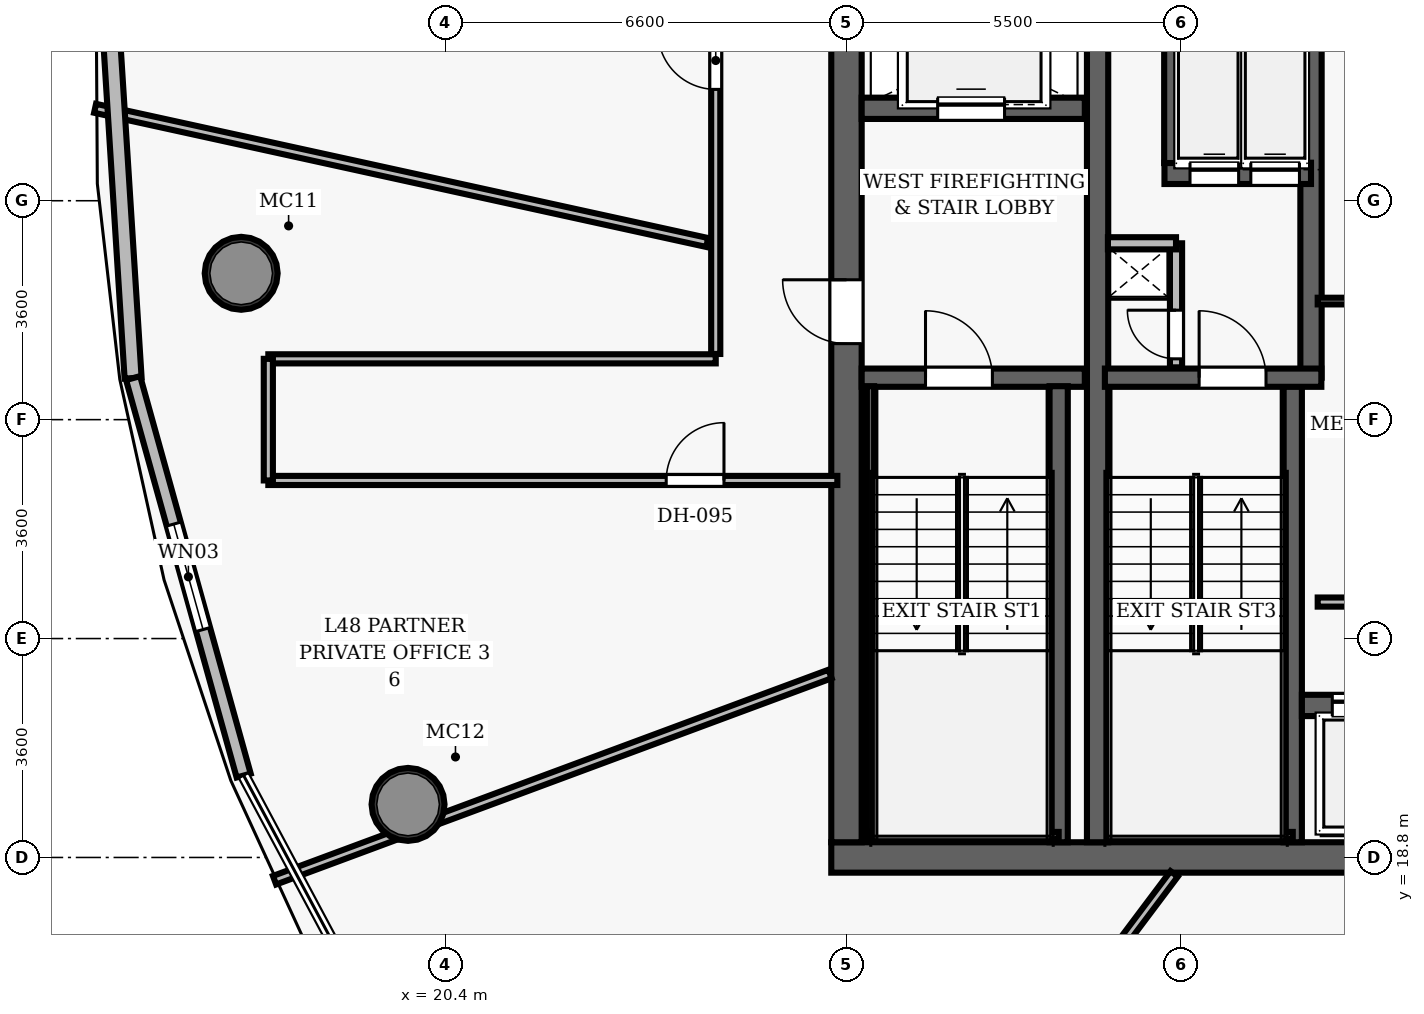
"""IFC4 building model, lengths in metres.
Left out: names, types, materials, properties, quantities, classifications, styles, units other than length and angle.
Written with IfcOpenShell. Run it as: python <this file> out.ifc"""

import sys

from ifc_helpers import new_model, si_unit, direction, frame, frame_2d, origin, origin_2d, place, context, subcontext, project, spatial, rectangle, hollow_circle, extrude, element, fill, save


model = new_model("IFC4")
c1 = context("Model", 3, precision=1e-05, world=origin(), true_north=direction((0.0, 1.0)))
c2 = subcontext(c1, "Body", "Model", "MODEL_VIEW")
j1 = project(units=[si_unit("LENGTHUNIT", "METRE"), si_unit("PLANEANGLEUNIT", "RADIAN")], contexts=[c1])
p1 = place(None, origin())
s1 = spatial("IfcSite", under=j1, at=p1, CompositionType="ELEMENT")
p2 = place(p1, origin())
s2 = spatial("IfcBuilding", under=s1, at=p2, CompositionType="ELEMENT")
p3 = place(p2, frame((0.0, 0.0, 190.45)))
s3 = spatial("IfcBuildingStorey", under=s2, at=p3, CompositionType="ELEMENT", Elevation=190.45)
p4 = place(p3, frame((26.75, 18.8, 0.0), z_axis=(0.0, 0.0, 1.0), x_axis=(1.0, 0.0, 0.0)))
e1 = element("IfcWall", 1, at=p4, inside=s3, PredefinedType="SHEAR", context=c2, shape_type="SweptSolid", body=[
    extrude(rectangle(XDim=22.5, YDim=0.5, at=frame_2d((11.25, 0.0))), origin(), (0.0, 0.0, 1.0), 3.85),
])
p5 = place(p4, frame((14.47, 0.0, 0.0)))
e2 = element("IfcOpeningElement", 2, at=p5, cuts=e1, PredefinedType="OPENING", context=c2, shape_type="SweptSolid", body=[
    extrude(rectangle(XDim=1.05, YDim=2.15, at=frame_2d((0.525, 1.075))), frame((0.0, 0.26, 0.0), z_axis=(0.0, -1.0, 0.0), x_axis=(1.0, 0.0, 0.0)), (0.0, 0.0, 1.0), 0.52),
])
p6 = place(p3, frame((27.0, 19.05, 0.0), z_axis=(0.0, 0.0, 1.0), x_axis=(0.0, 1.0, 0.0)))
e3 = element("IfcWall", 3, at=p6, inside=s3, PredefinedType="SHEAR", context=c2, shape_type="SweptSolid", body=[
    extrude(rectangle(XDim=13.9, YDim=0.5, at=frame_2d((6.95, 0.0))), origin(), (0.0, 0.0, 1.0), 3.85),
])
p7 = place(p6, frame((8.2, 0.0, 0.0)))
e4 = element("IfcOpeningElement", 4, at=p7, cuts=e3, PredefinedType="OPENING", context=c2, shape_type="SweptSolid", body=[
    extrude(rectangle(XDim=1.05, YDim=2.15, at=frame_2d((0.525, 1.075))), frame((0.0, 0.26, 0.0), z_axis=(0.0, -1.0, 0.0), x_axis=(1.0, 0.0, 0.0)), (0.0, 0.0, 1.0), 0.52),
])
p8 = place(p3, frame((31.13, 19.05, 0.0), z_axis=(0.0, 0.0, 1.0), x_axis=(0.0, 1.0, 0.0)))
e5 = element("IfcWall", 5, at=p8, inside=s3, PredefinedType="SHEAR", context=c2, shape_type="SweptSolid", body=[
    extrude(rectangle(XDim=13.9, YDim=0.35, at=frame_2d((6.95, 0.0))), origin(), (0.0, 0.0, 1.0), 3.85),
])
for number, where, z_axis, x_axis in (
    (6, (17.045, 28.406, 0.0), (0.0, 0.0, 1.0), (1.0, 0.0, 0.0)),
    (7, (19.79, 19.673, 0.0), (0.0, 0.0, 1.0), (1.0, 0.0, 0.0)),
):
    element("IfcColumn", number, at=place(p3, frame(where, z_axis=z_axis, x_axis=x_axis)), inside=s3, PredefinedType="COLUMN", context=c2, shape_type="SweptSolid", body=[
        extrude(hollow_circle(Radius=0.6, WallThickness=0.05, at=origin_2d()), origin(), (0.0, 0.0, 1.0), 3.85),
    ])
p9 = place(p3, frame((27.25, 26.69, 0.0), z_axis=(0.0, 0.0, 1.0), x_axis=(1.0, 0.0, 0.0)))
e8 = element("IfcWall", 8, at=p9, inside=s3, PredefinedType="SHEAR", context=c2, shape_type="SweptSolid", body=[
    extrude(rectangle(XDim=3.67, YDim=0.3, at=frame_2d((1.835, 0.0))), origin(), (0.0, 0.0, 1.0), 3.85),
])
p10 = place(p9, frame((1.05, 0.0, 0.0)))
e9 = element("IfcOpeningElement", 9, at=p10, cuts=e8, PredefinedType="OPENING", context=c2, shape_type="SweptSolid", body=[
    extrude(rectangle(XDim=1.1, YDim=2.15, at=frame_2d((0.55, 1.075))), frame((0.0, 0.16, 0.0), z_axis=(0.0, -1.0, 0.0), x_axis=(1.0, 0.0, 0.0)), (0.0, 0.0, 1.0), 0.32),
])
p11 = place(p3, frame((30.49, 19.05, 0.0), z_axis=(0.0, 0.0, 1.0), x_axis=(0.0, 1.0, 0.0)))
e10 = element("IfcWall", 10, at=p11, inside=s3, PredefinedType="SHEAR", context=c2, shape_type="SweptSolid", body=[
    extrude(rectangle(XDim=7.5, YDim=0.3, at=frame_2d((3.75, 0.0))), origin(), (0.0, 0.0, 1.0), 3.85),
])
p12 = place(p3, frame((27.395, 19.1, 0.0), z_axis=(0.0, 0.0, 1.0), x_axis=(0.0, 1.0, 0.0)))
e11 = element("IfcWall", 11, at=p12, inside=s3, PredefinedType="SHEAR", context=c2, shape_type="SweptSolid", body=[
    extrude(rectangle(XDim=7.45, YDim=0.12, at=frame_2d((3.725, 0.0))), origin(), (0.0, 0.0, 1.0), 3.85),
])
p13 = place(p3, frame((27.395, 19.16, 0.0), z_axis=(0.0, 0.0, 1.0), x_axis=(1.0, 0.0, 0.0)))
e12 = element("IfcWall", 12, at=p13, inside=s3, PredefinedType="SHEAR", context=c2, shape_type="SweptSolid", body=[
    extrude(rectangle(XDim=3.095, YDim=0.12, at=frame_2d((1.547, 0.0))), origin(), (0.0, 0.0, 1.0), 3.85),
])
p14 = place(p3, frame((27.25, 31.12, 0.0), z_axis=(0.0, 0.0, 1.0), x_axis=(1.0, 0.0, 0.0)))
e13 = element("IfcWall", 13, at=p14, inside=s3, PredefinedType="SHEAR", context=c2, shape_type="SweptSolid", body=[
    extrude(rectangle(XDim=3.67, YDim=0.35, at=frame_2d((1.835, 0.0))), origin(), (0.0, 0.0, 1.0), 3.035),
])
p15 = place(p14, frame((1.25, 0.0, 0.0)))
e14 = element("IfcOpeningElement", 14, at=p15, cuts=e13, PredefinedType="OPENING", context=c2, shape_type="SweptSolid", body=[
    extrude(rectangle(XDim=1.1, YDim=2.15, at=frame_2d((0.55, 1.075))), frame((0.0, 0.185, 0.0), z_axis=(0.0, -1.0, 0.0), x_axis=(1.0, 0.0, 0.0)), (0.0, 0.0, 1.0), 0.37),
])
p16 = place(p3, frame((34.34, 19.05, 0.0), z_axis=(0.0, 0.0, 1.0), x_axis=(0.0, 1.0, 0.0)))
e15 = element("IfcWall", 15, at=p16, inside=s3, PredefinedType="SHEAR", context=c2, shape_type="SweptSolid", body=[
    extrude(rectangle(XDim=7.5, YDim=0.3, at=frame_2d((3.75, 0.0))), origin(), (0.0, 0.0, 1.0), 3.85),
])
p17 = place(p3, frame((34.64, 26.69, 0.0), z_axis=(0.0, 0.0, 1.0), x_axis=(0.0, 1.0, 0.0)))
e16 = element("IfcWall", 16, at=p17, inside=s3, PredefinedType="SHEAR", context=c2, shape_type="SweptSolid", body=[
    extrude(rectangle(XDim=6.26, YDim=0.35, at=frame_2d((3.13, 0.0))), origin(), (0.0, 0.0, 1.0), 3.85),
])
p18 = place(p3, frame((31.25, 26.69, 0.0), z_axis=(0.0, 0.0, 1.0), x_axis=(1.0, 0.0, 0.0)))
e17 = element("IfcWall", 17, at=p18, inside=s3, PredefinedType="SHEAR", context=c2, shape_type="SweptSolid", body=[
    extrude(rectangle(XDim=3.56, YDim=0.3, at=frame_2d((1.78, 0.0))), origin(), (0.0, 0.0, 1.0), 3.85),
])
p19 = place(p18, frame((1.55, 0.0, 0.0)))
e18 = element("IfcOpeningElement", 18, at=p19, cuts=e17, PredefinedType="OPENING", context=c2, shape_type="SweptSolid", body=[
    extrude(rectangle(XDim=1.1, YDim=2.15, at=frame_2d((0.55, 1.075))), frame((0.0, 0.16, 0.0), z_axis=(0.0, -1.0, 0.0), x_axis=(1.0, 0.0, 0.0)), (0.0, 0.0, 1.0), 0.32),
])
p20 = place(p3, frame((31.3, 19.16, 0.0), z_axis=(0.0, 0.0, 1.0), x_axis=(1.0, 0.0, 0.0)))
e19 = element("IfcWall", 19, at=p20, inside=s3, PredefinedType="SHEAR", context=c2, shape_type="SweptSolid", body=[
    extrude(rectangle(XDim=3.04, YDim=0.12, at=frame_2d((1.52, 0.0))), origin(), (0.0, 0.0, 1.0), 3.85),
])
p21 = place(p3, frame((32.23, 30.05, 0.0), z_axis=(0.0, 0.0, 1.0), x_axis=(1.0, 0.0, 0.0)))
e20 = element("IfcWall", 20, at=p21, inside=s3, PredefinedType="SHEAR", context=c2, shape_type="SweptSolid", body=[
    extrude(rectangle(XDim=2.41, YDim=0.35, at=frame_2d((1.205, 0.0))), origin(), (0.0, 0.0, 1.0), 3.035),
])
p22 = place(p21, frame((0.42, 0.0, 0.0)))
e21 = element("IfcOpeningElement", 21, at=p22, cuts=e20, PredefinedType="OPENING", context=c2, shape_type="SweptSolid", body=[
    extrude(rectangle(XDim=0.8, YDim=2.15, at=frame_2d((0.4, 1.075))), frame((0.0, 0.185, 0.0), z_axis=(0.0, -1.0, 0.0), x_axis=(1.0, 0.0, 0.0)), (0.0, 0.0, 1.0), 0.37),
])
p23 = place(p21, frame((1.42, 0.0, 0.0)))
e22 = element("IfcOpeningElement", 22, at=p23, cuts=e20, PredefinedType="OPENING", context=c2, shape_type="SweptSolid", body=[
    extrude(rectangle(XDim=0.8, YDim=2.15, at=frame_2d((0.4, 1.075))), frame((0.0, 0.185, 0.0), z_axis=(0.0, -1.0, 0.0), x_axis=(1.0, 0.0, 0.0)), (0.0, 0.0, 1.0), 0.37),
])
p24 = place(p3, frame((32.4, 30.22, 0.0), z_axis=(0.0, 0.0, 1.0), x_axis=(0.0, 1.0, 0.0)))
e23 = element("IfcWall", 23, at=p24, inside=s3, PredefinedType="SHEAR", context=c2, shape_type="SweptSolid", body=[
    extrude(rectangle(XDim=2.73, YDim=0.35, at=frame_2d((1.365, 0.0))), origin(), (0.0, 0.0, 1.0), 3.035),
])
p25 = place(p3, frame((32.42, 26.86, 0.0), z_axis=(0.0, 0.0, 1.0), x_axis=(0.0, 1.0, 0.0)))
e24 = element("IfcWall", 24, at=p25, inside=s3, PredefinedType="PARTITIONING", context=c2, shape_type="SweptSolid", body=[
    extrude(rectangle(XDim=2.04, YDim=0.2, at=frame_2d((1.02, 0.0))), origin(), (0.0, 0.0, 1.0), 3.035),
])
p26 = place(p25, frame((0.14, 0.0, 0.0)))
e25 = element("IfcOpeningElement", 25, at=p26, cuts=e24, PredefinedType="OPENING", context=c2, shape_type="SweptSolid", body=[
    extrude(rectangle(XDim=0.8, YDim=2.05, at=frame_2d((0.4, 1.025))), frame((0.0, 0.11, 0.0), z_axis=(0.0, -1.0, 0.0), x_axis=(1.0, 0.0, 0.0)), (0.0, 0.0, 1.0), 0.22),
])
p27 = place(p3, frame((31.3, 28.9, 0.0), z_axis=(0.0, 0.0, 1.0), x_axis=(1.0, 0.0, 0.0)))
e26 = element("IfcWall", 26, at=p27, inside=s3, PredefinedType="PARTITIONING", context=c2, shape_type="SweptSolid", body=[
    extrude(rectangle(XDim=1.12, YDim=0.2, at=frame_2d((0.56, 0.0))), origin(), (0.0, 0.0, 1.0), 3.035),
])
p28 = place(p3, frame((34.49, 21.3, 0.0), z_axis=(0.0, 0.0, 1.0), x_axis=(1.0, 0.0, 0.0)))
e27 = element("IfcWall", 27, at=p28, inside=s3, PredefinedType="SHEAR", context=c2, shape_type="SweptSolid", body=[
    extrude(rectangle(XDim=6.68, YDim=0.35, at=frame_2d((3.34, 0.0))), origin(), (0.0, 0.0, 1.0), 3.035),
])
p29 = place(p28, frame((0.5, 0.0, 0.0)))
e28 = element("IfcOpeningElement", 28, at=p29, cuts=e27, PredefinedType="OPENING", context=c2, shape_type="SweptSolid", body=[
    extrude(rectangle(XDim=0.9, YDim=2.15, at=frame_2d((0.45, 1.075))), frame((0.0, 0.185, 0.0), z_axis=(0.0, -1.0, 0.0), x_axis=(1.0, 0.0, 0.0)), (0.0, 0.0, 1.0), 0.37),
])
p30 = place(p28, frame((2.58, 0.0, 0.0)))
e29 = element("IfcOpeningElement", 29, at=p30, cuts=e27, PredefinedType="OPENING", context=c2, shape_type="SweptSolid", body=[
    extrude(rectangle(XDim=0.9, YDim=2.15, at=frame_2d((0.45, 1.075))), frame((0.0, 0.185, 0.0), z_axis=(0.0, -1.0, 0.0), x_axis=(1.0, 0.0, 0.0)), (0.0, 0.0, 1.0), 0.37),
])
p31 = place(p28, frame((4.66, 0.0, 0.0)))
e30 = element("IfcOpeningElement", 30, at=p31, cuts=e27, PredefinedType="OPENING", context=c2, shape_type="SweptSolid", body=[
    extrude(rectangle(XDim=0.9, YDim=2.15, at=frame_2d((0.45, 1.075))), frame((0.0, 0.185, 0.0), z_axis=(0.0, -1.0, 0.0), x_axis=(1.0, 0.0, 0.0)), (0.0, 0.0, 1.0), 0.37),
])
p32 = place(p3, frame((34.75, 23.0, 0.0), z_axis=(0.0, 0.0, 1.0), x_axis=(1.0, 0.0, 0.0)))
e31 = element("IfcWall", 31, at=p32, inside=s3, PredefinedType="PARTITIONING", context=c2, shape_type="SweptSolid", body=[
    extrude(rectangle(XDim=6.25, YDim=0.15, at=frame_2d((3.125, 0.0))), origin(), (0.0, 0.0, 1.0), 3.035),
])
p33 = place(p3, frame((34.75, 27.95, 0.0), z_axis=(0.0, 0.0, 1.0), x_axis=(1.0, 0.0, 0.0)))
e32 = element("IfcWall", 32, at=p33, inside=s3, PredefinedType="PARTITIONING", context=c2, shape_type="SweptSolid", body=[
    extrude(rectangle(XDim=6.25, YDim=0.11, at=frame_2d((3.125, 0.0))), origin(), (0.0, 0.0, 1.0), 3.035),
])
p34 = place(p3, frame((24.85, 27.08, 0.0), z_axis=(0.0, 0.0, 1.0), x_axis=(0.0, 1.0, 0.0)))
e33 = element("IfcWall", 33, at=p34, inside=s3, PredefinedType="PARTITIONING", context=c2, shape_type="SweptSolid", body=[
    extrude(rectangle(XDim=8.12, YDim=0.15, at=frame_2d((4.06, 0.0))), origin(), (0.0, 0.0, 1.0), 3.035),
])
p35 = place(p34, frame((4.351, 0.0, 0.0)))
e34 = element("IfcOpeningElement", 34, at=p35, cuts=e33, PredefinedType="OPENING", context=c2, shape_type="SweptSolid", body=[
    extrude(rectangle(XDim=0.95, YDim=2.15, at=frame_2d((0.475, 1.075))), frame((0.0, 0.085, 0.0), z_axis=(0.0, -1.0, 0.0), x_axis=(1.0, 0.0, 0.0)), (0.0, 0.0, 1.0), 0.17),
])
p36 = place(p3, frame((17.492, 27.0, 0.0), z_axis=(0.0, 0.0, 1.0), x_axis=(1.0, 0.0, 0.0)))
e35 = element("IfcWall", 35, at=p36, inside=s3, PredefinedType="PARTITIONING", context=c2, shape_type="SweptSolid", body=[
    extrude(rectangle(XDim=7.358, YDim=0.15, at=frame_2d((3.679, 0.0))), origin(), (0.0, 0.0, 1.0), 3.035),
])
p37 = place(p3, frame((17.492, 25.0, 0.0), z_axis=(0.0, 0.0, 1.0), x_axis=(1.0, 0.0, 0.0)))
e36 = element("IfcWall", 36, at=p37, inside=s3, PredefinedType="PARTITIONING", context=c2, shape_type="SweptSolid", body=[
    extrude(rectangle(XDim=9.358, YDim=0.15, at=frame_2d((4.679, 0.0))), origin(), (0.0, 0.0, 1.0), 3.035),
])
p38 = place(p37, frame((6.544, 0.0, 0.0)))
e37 = element("IfcOpeningElement", 37, at=p38, cuts=e36, PredefinedType="OPENING", context=c2, shape_type="SweptSolid", body=[
    extrude(rectangle(XDim=0.95, YDim=2.15, at=frame_2d((0.475, 1.075))), frame((0.0, 0.085, 0.0), z_axis=(0.0, -1.0, 0.0), x_axis=(1.0, 0.0, 0.0)), (0.0, 0.0, 1.0), 0.17),
])
p39 = place(p3, frame((17.492, 25.0, 0.0), z_axis=(0.0, 0.0, 1.0), x_axis=(0.0, 1.0, 0.0)))
e38 = element("IfcWall", 38, at=p39, inside=s3, PredefinedType="PARTITIONING", context=c2, shape_type="SweptSolid", body=[
    extrude(rectangle(XDim=2.0, YDim=0.15, at=frame_2d((1.0, 0.0))), origin(), (0.0, 0.0, 1.0), 3.035),
])
p40 = place(p3, frame((24.71, 28.913, 0.0), z_axis=(0.0, 0.0, 1.0), x_axis=(-0.97680395447, 0.214135551772, 0.0)))
e39 = element("IfcWall", 39, at=p40, inside=s3, PredefinedType="PARTITIONING", context=c2, shape_type="SweptSolid", body=[
    extrude(rectangle(XDim=10.307, YDim=0.15, at=frame_2d((5.153, 0.0))), origin(), (0.0, 0.0, 1.0), 3.035),
])
p41 = place(p3, frame((26.73, 21.817, 0.0), z_axis=(0.0, 0.0, 1.0), x_axis=(-0.937500713905, -0.347983349353, 0.0)))
e40 = element("IfcWall", 40, at=p41, inside=s3, PredefinedType="PARTITIONING", context=c2, shape_type="SweptSolid", body=[
    extrude(rectangle(XDim=9.745, YDim=0.15, at=frame_2d((4.873, 0.0))), origin(), (0.0, 0.0, 1.0), 3.035),
])
p42 = place(p3, frame((32.389, 18.53, 0.0), z_axis=(0.0, 0.0, 1.0), x_axis=(-0.600540681627, -0.79959420315, 0.0)))
e41 = element("IfcWall", 41, at=p42, inside=s3, PredefinedType="PARTITIONING", context=c2, shape_type="SweptSolid", body=[
    extrude(rectangle(XDim=12.423, YDim=0.15, at=frame_2d((6.212, 0.0))), origin(), (0.0, 0.0, 1.0), 3.035),
])
p43 = place(p3, frame((15.268, 26.683, 0.0), z_axis=(0.0, 0.0, 1.0), x_axis=(-0.063166731374, 0.998002987995, 0.0)))
e42 = element("IfcWall", 42, at=p43, inside=s3, PredefinedType="SOLIDWALL", context=c2, shape_type="SweptSolid", body=[
    extrude(rectangle(XDim=6.227, YDim=0.28, at=frame_2d((3.113, 0.0))), origin(), (0.0, 0.0, 1.0), 3.62),
])
p44 = place(p3, frame((17.086, 20.147, 0.0), z_axis=(0.0, 0.0, 1.0), x_axis=(-0.268022467679, 0.963412661749, 0.0)))
e43 = element("IfcWall", 43, at=p44, inside=s3, PredefinedType="SOLIDWALL", context=c2, shape_type="SweptSolid", body=[
    extrude(rectangle(XDim=6.784, YDim=0.24, at=frame_2d((3.392, 0.0))), origin(), (0.0, 0.0, 1.0), 3.62),
])
p45 = place(p44, frame((2.492, 0.0, 0.85)))
e44 = element("IfcOpeningElement", 44, at=p45, cuts=e43, PredefinedType="OPENING", context=c2, shape_type="SweptSolid", body=[
    extrude(rectangle(XDim=1.8, YDim=1.8, at=frame_2d((0.9, 0.9))), frame((0.0, 0.13, 0.0), z_axis=(0.0, -1.0, 0.0), x_axis=(1.0, 0.0, 0.0)), (0.0, 0.0, 1.0), 0.26),
])
p46 = place(p10, origin())
e45 = element("IfcDoor", 45, at=p46, inside=s3, OperationType="SINGLE_SWING_LEFT", PredefinedType="DOOR", context=c2, shape_type="SweptSolid", body=[
    extrude(rectangle(XDim=1.1, YDim=2.15, at=frame_2d((0.55, 1.075))), frame((0.0, 0.025, 0.0), z_axis=(0.0, -1.0, 0.0), x_axis=(1.0, 0.0, 0.0)), (0.0, 0.0, 1.0), 0.05),
])
fill(e9, e45)
p47 = place(p7, origin())
e46 = element("IfcDoor", 46, at=p47, inside=s3, OperationType="SINGLE_SWING_RIGHT", PredefinedType="DOOR", context=c2, shape_type="SweptSolid", body=[
    extrude(rectangle(XDim=1.05, YDim=2.15, at=frame_2d((0.525, 1.075))), frame((0.0, 0.025, 0.0), z_axis=(0.0, -1.0, 0.0), x_axis=(1.0, 0.0, 0.0)), (0.0, 0.0, 1.0), 0.05),
])
fill(e4, e46)
p48 = place(p19, origin())
e47 = element("IfcDoor", 47, at=p48, inside=s3, OperationType="SINGLE_SWING_LEFT", PredefinedType="DOOR", context=c2, shape_type="SweptSolid", body=[
    extrude(rectangle(XDim=1.1, YDim=2.15, at=frame_2d((0.55, 1.075))), frame((0.0, 0.025, 0.0), z_axis=(0.0, -1.0, 0.0), x_axis=(1.0, 0.0, 0.0)), (0.0, 0.0, 1.0), 0.05),
])
fill(e18, e47)
p49 = place(p26, origin())
e48 = element("IfcDoor", 48, at=p49, inside=s3, OperationType="SINGLE_SWING_RIGHT", PredefinedType="DOOR", context=c2, shape_type="SweptSolid", body=[
    extrude(rectangle(XDim=0.8, YDim=2.05, at=frame_2d((0.4, 1.025))), frame((0.0, 0.025, 0.0), z_axis=(0.0, -1.0, 0.0), x_axis=(1.0, 0.0, 0.0)), (0.0, 0.0, 1.0), 0.05),
])
fill(e25, e48)
p50 = place(p35, origin())
e49 = element("IfcDoor", 49, at=p50, inside=s3, OperationType="SINGLE_SWING_RIGHT", PredefinedType="DOOR", context=c2, shape_type="SweptSolid", body=[
    extrude(rectangle(XDim=0.95, YDim=2.15, at=frame_2d((0.475, 1.075))), frame((0.0, 0.025, 0.0), z_axis=(0.0, -1.0, 0.0), x_axis=(1.0, 0.0, 0.0)), (0.0, 0.0, 1.0), 0.05),
])
fill(e34, e49)
p51 = place(p38, origin())
e50 = element("IfcDoor", 50, at=p51, inside=s3, OperationType="SINGLE_SWING_RIGHT", PredefinedType="DOOR", context=c2, shape_type="SweptSolid", body=[
    extrude(rectangle(XDim=0.95, YDim=2.15, at=frame_2d((0.475, 1.075))), frame((0.0, 0.025, 0.0), z_axis=(0.0, -1.0, 0.0), x_axis=(1.0, 0.0, 0.0)), (0.0, 0.0, 1.0), 0.05),
])
fill(e37, e50)
p52 = place(p29, origin())
e51 = element("IfcDoor", 51, at=p52, inside=s3, OperationType="SLIDING_TO_LEFT", PredefinedType="DOOR", context=c2, shape_type="SweptSolid", body=[
    extrude(rectangle(XDim=0.9, YDim=2.15, at=frame_2d((0.45, 1.075))), frame((0.0, 0.025, 0.0), z_axis=(0.0, -1.0, 0.0), x_axis=(1.0, 0.0, 0.0)), (0.0, 0.0, 1.0), 0.05),
])
fill(e28, e51)
p53 = place(p15, origin())
e52 = element("IfcDoor", 52, at=p53, inside=s3, OperationType="SLIDING_TO_LEFT", PredefinedType="DOOR", context=c2, shape_type="SweptSolid", body=[
    extrude(rectangle(XDim=1.1, YDim=2.15, at=frame_2d((0.55, 1.075))), frame((0.0, 0.025, 0.0), z_axis=(0.0, -1.0, 0.0), x_axis=(1.0, 0.0, 0.0)), (0.0, 0.0, 1.0), 0.05),
])
fill(e14, e52)
p54 = place(p22, origin())
e53 = element("IfcDoor", 53, at=p54, inside=s3, OperationType="SLIDING_TO_LEFT", PredefinedType="DOOR", context=c2, shape_type="SweptSolid", body=[
    extrude(rectangle(XDim=0.8, YDim=2.15, at=frame_2d((0.4, 1.075))), frame((0.0, 0.025, 0.0), z_axis=(0.0, -1.0, 0.0), x_axis=(1.0, 0.0, 0.0)), (0.0, 0.0, 1.0), 0.05),
])
fill(e21, e53)
p55 = place(p23, origin())
e54 = element("IfcDoor", 54, at=p55, inside=s3, OperationType="SLIDING_TO_LEFT", PredefinedType="DOOR", context=c2, shape_type="SweptSolid", body=[
    extrude(rectangle(XDim=0.8, YDim=2.15, at=frame_2d((0.4, 1.075))), frame((0.0, 0.025, 0.0), z_axis=(0.0, -1.0, 0.0), x_axis=(1.0, 0.0, 0.0)), (0.0, 0.0, 1.0), 0.05),
])
fill(e22, e54)
p56 = place(p45, origin())
e55 = element("IfcWindow", 55, at=p56, inside=s3, PartitioningType="SINGLE_PANEL", PredefinedType="WINDOW", context=c2, shape_type="SweptSolid", body=[
    extrude(rectangle(XDim=1.8, YDim=1.8, at=frame_2d((0.9, 0.9))), frame((0.0, 0.03, 0.0), z_axis=(0.0, -1.0, 0.0), x_axis=(1.0, 0.0, 0.0)), (0.0, 0.0, 1.0), 0.06),
])
fill(e44, e55)
save(model, sys.argv[1])
